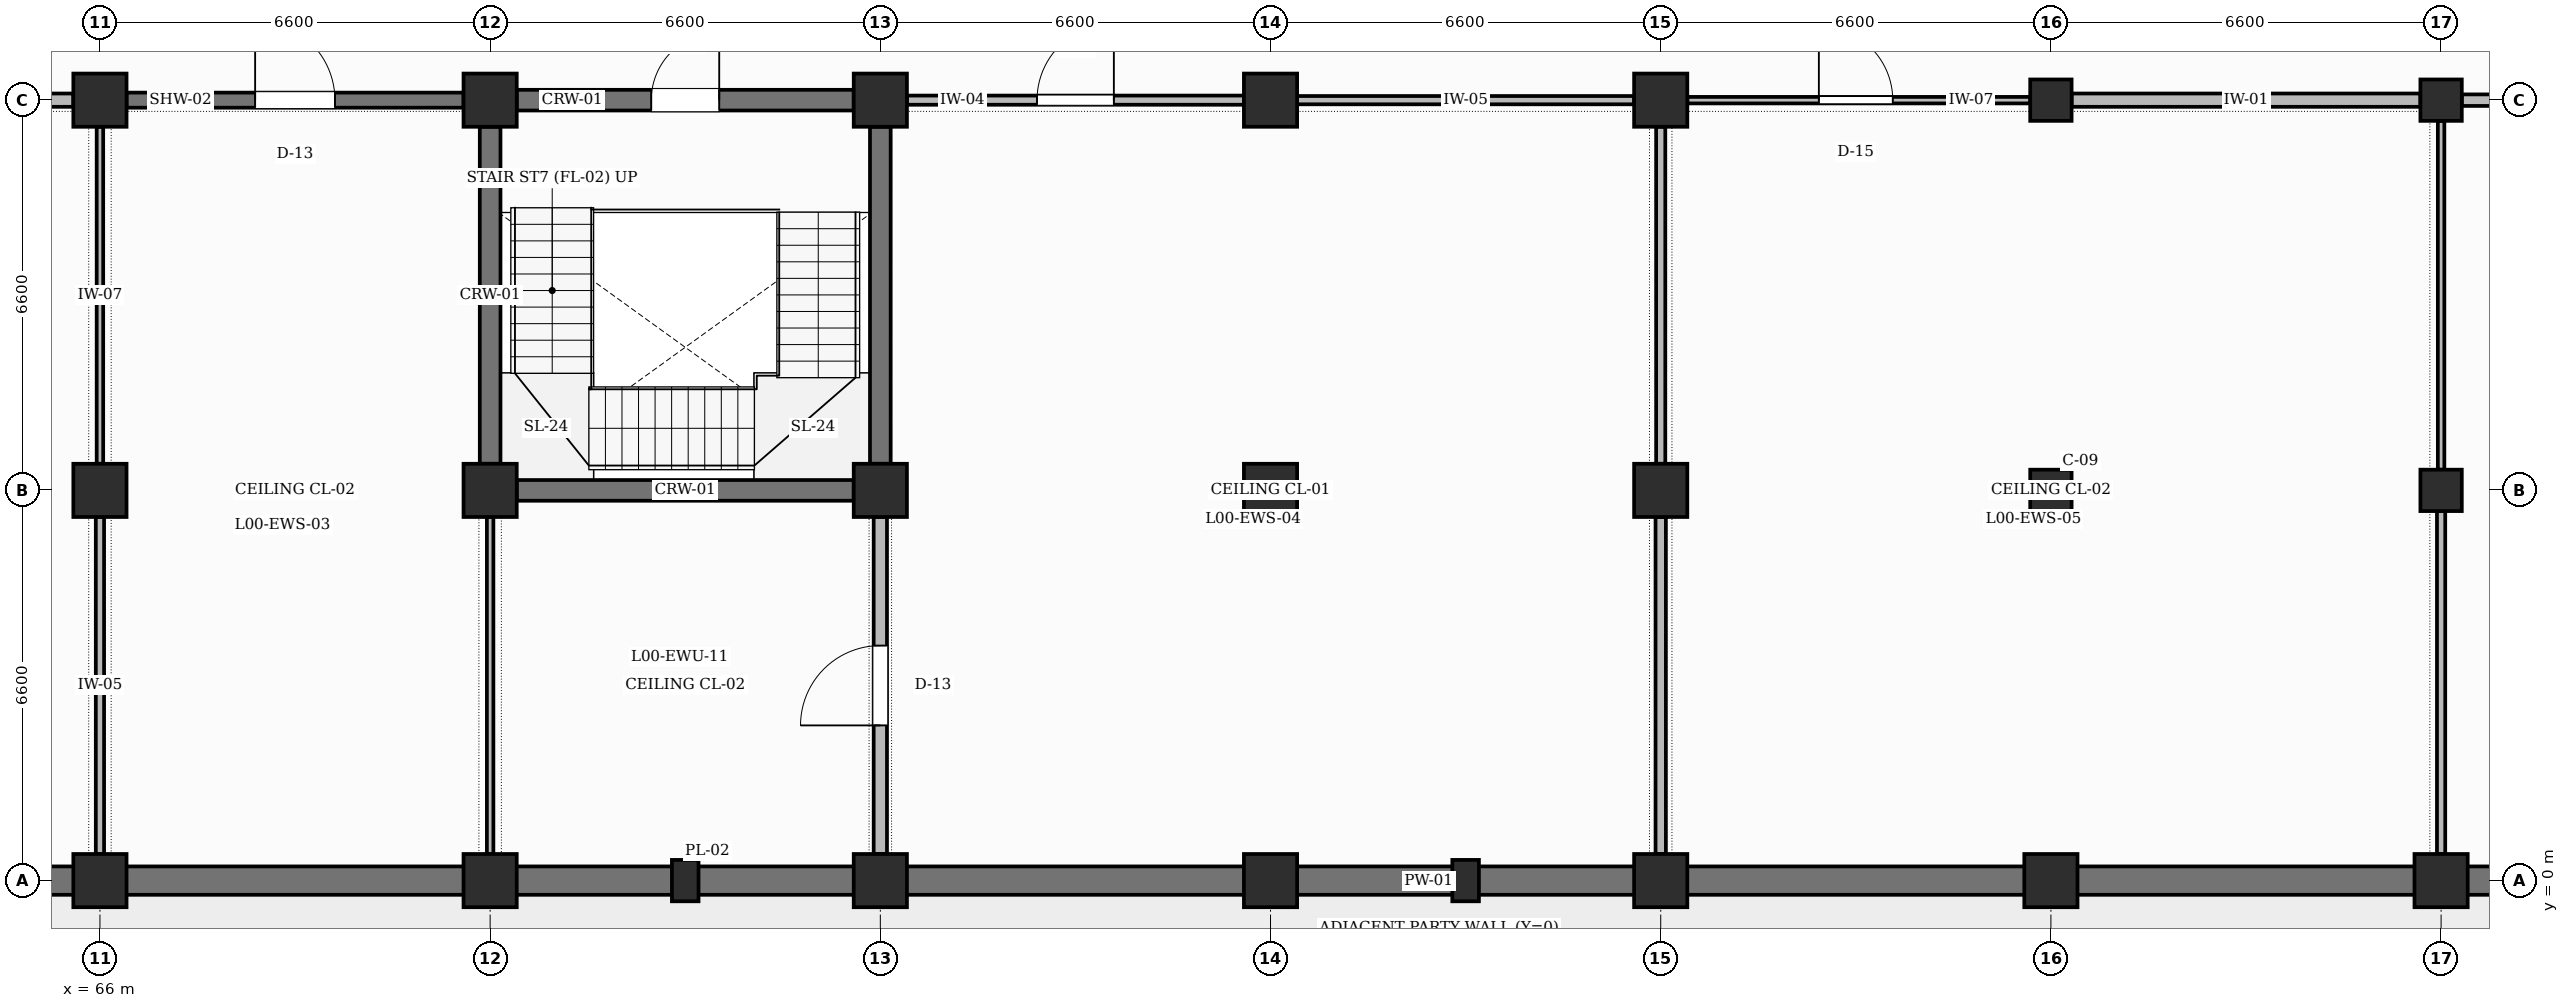
"""IFC4 building model, lengths in metres.
Left out: names, types, materials, properties, quantities, classifications, styles, units other than length and angle.
Written with IfcOpenShell. Run it as: python <this file> out.ifc"""

import sys

from ifc_helpers import new_model, si_unit, direction, frame, frame_2d, origin, origin_2d, place, context, subcontext, project, spatial, rectangle, circle, extrude, element, fill, save


model = new_model("IFC4")
c1 = context("Model", 3, precision=1e-05, world=origin(), true_north=direction((0.0, 1.0)))
c2 = subcontext(c1, "Body", "Model", "MODEL_VIEW")
j1 = project(units=[si_unit("LENGTHUNIT", "METRE"), si_unit("PLANEANGLEUNIT", "RADIAN")], contexts=[c1])
p1 = place(None, origin())
s1 = spatial("IfcSite", under=j1, at=p1, CompositionType="ELEMENT")
p2 = place(p1, origin())
s2 = spatial("IfcBuilding", under=s1, at=p2, CompositionType="ELEMENT")
p3 = place(p2, origin())
s3 = spatial("IfcBuildingStorey", under=s2, at=p3, CompositionType="ELEMENT", Elevation=0.0)
for number, where, z_axis, x_axis in (
    (1, (75.9, 0.0, 0.0), (0.0, 0.0, 1.0), (1.0, 0.0, 0.0)),
    (2, (89.1, 0.0, 0.0), (0.0, 0.0, 1.0), (1.0, 0.0, 0.0)),
):
    element("IfcColumn", number, at=place(p3, frame(where, z_axis=z_axis, x_axis=x_axis)), inside=s3, PredefinedType="PILASTER", context=c2, shape_type="SweptSolid", body=[
        extrude(rectangle(XDim=0.45, YDim=0.7, at=origin_2d()), origin(), (0.0, 0.0, 1.0), 5.4),
    ])
for number, where, z_axis, x_axis in (
    (3, (66.0, 0.0, 0.0), (0.0, 0.0, 1.0), (1.0, 0.0, 0.0)),
    (4, (66.0, 6.6, 0.0), (0.0, 0.0, 1.0), (1.0, 0.0, 0.0)),
    (5, (66.0, 13.2, 0.0), (0.0, 0.0, 1.0), (1.0, 0.0, 0.0)),
    (6, (72.6, 0.0, 0.0), (0.0, 0.0, 1.0), (1.0, 0.0, 0.0)),
    (7, (72.6, 6.6, 0.0), (0.0, 0.0, 1.0), (1.0, 0.0, 0.0)),
    (8, (72.6, 13.2, 0.0), (0.0, 0.0, 1.0), (1.0, 0.0, 0.0)),
    (9, (79.2, 0.0, 0.0), (0.0, 0.0, 1.0), (1.0, 0.0, 0.0)),
    (10, (79.2, 6.6, 0.0), (0.0, 0.0, 1.0), (1.0, 0.0, 0.0)),
    (11, (79.2, 13.2, 0.0), (0.0, 0.0, 1.0), (1.0, 0.0, 0.0)),
    (12, (85.8, 0.0, 0.0), (0.0, 0.0, 1.0), (1.0, 0.0, 0.0)),
    (13, (85.8, 6.6, 0.0), (0.0, 0.0, 1.0), (1.0, 0.0, 0.0)),
    (14, (85.8, 13.2, 0.0), (0.0, 0.0, 1.0), (1.0, 0.0, 0.0)),
    (15, (92.4, 0.0, 0.0), (0.0, 0.0, 1.0), (1.0, 0.0, 0.0)),
    (16, (92.4, 6.6, 0.0), (0.0, 0.0, 1.0), (1.0, 0.0, 0.0)),
    (17, (92.4, 13.2, 0.0), (0.0, 0.0, 1.0), (1.0, 0.0, 0.0)),
    (18, (99.0, 0.0, 0.0), (0.0, 0.0, 1.0), (1.0, 0.0, 0.0)),
):
    element("IfcColumn", number, at=place(p3, frame(where, z_axis=z_axis, x_axis=x_axis)), inside=s3, PredefinedType="COLUMN", context=c2, shape_type="SweptSolid", body=[
        extrude(rectangle(XDim=0.9, YDim=0.9, at=origin_2d()), origin(), (0.0, 0.0, 1.0), 5.4),
    ])
for number, where, z_axis, x_axis in (
    (19, (99.0, 6.6, 0.0), (0.0, 0.0, 1.0), (1.0, 0.0, 0.0)),
    (20, (99.0, 13.2, 0.0), (0.0, 0.0, 1.0), (1.0, 0.0, 0.0)),
):
    element("IfcColumn", number, at=place(p3, frame(where, z_axis=z_axis, x_axis=x_axis)), inside=s3, PredefinedType="COLUMN", context=c2, shape_type="SweptSolid", body=[
        extrude(circle(Radius=0.35, at=origin_2d()), origin(), (0.0, 0.0, 1.0), 5.4),
    ])
p4 = place(p3, frame((105.6, 0.0, 0.0), z_axis=(0.0, 0.0, 1.0), x_axis=(1.0, 0.0, 0.0)))
e21 = element("IfcColumn", 21, at=p4, inside=s3, PredefinedType="COLUMN", context=c2, shape_type="SweptSolid", body=[
    extrude(rectangle(XDim=0.9, YDim=0.9, at=origin_2d()), origin(), (0.0, 0.0, 1.0), 5.4),
])
for number, where, z_axis, x_axis in (
    (22, (105.6, 6.6, 0.0), (0.0, 0.0, 1.0), (1.0, 0.0, 0.0)),
    (23, (105.6, 13.2, 0.0), (0.0, 0.0, 1.0), (1.0, 0.0, 0.0)),
):
    element("IfcColumn", number, at=place(p3, frame(where, z_axis=z_axis, x_axis=x_axis)), inside=s3, PredefinedType="COLUMN", context=c2, shape_type="SweptSolid", body=[
        extrude(circle(Radius=0.35, at=origin_2d()), origin(), (0.0, 0.0, 1.0), 5.4),
    ])
for number, where, z_axis, x_axis in (
    (24, (59.85, 0.0, 0.0), (0.0, 0.0, 1.0), (1.0, 0.0, 0.0)),
    (25, (66.45, 0.0, 0.0), (0.0, 0.0, 1.0), (1.0, 0.0, 0.0)),
    (26, (73.05, 0.0, 0.0), (0.0, 0.0, 1.0), (1.0, 0.0, 0.0)),
):
    element("IfcWall", number, at=place(p3, frame(where, z_axis=z_axis, x_axis=x_axis)), inside=s3, PredefinedType="SOLIDWALL", context=c2, shape_type="SweptSolid", body=[
        extrude(rectangle(XDim=5.7, YDim=0.48, at=frame_2d((2.85, 0.0))), origin(), (0.0, 0.0, 1.0), 4.45),
    ])
p5 = place(p3, frame((79.65, 0.0, 0.0), z_axis=(0.0, 0.0, 1.0), x_axis=(1.0, 0.0, 0.0)))
e27 = element("IfcWall", 27, at=p5, inside=s3, PredefinedType="SOLIDWALL", context=c2, shape_type="SweptSolid", body=[
    extrude(rectangle(XDim=5.7, YDim=0.48, at=frame_2d((2.85, 0.0))), origin(), (0.0, 0.0, 1.0), 4.45),
])
for number, where, z_axis, x_axis in (
    (28, (86.25, 0.0, 0.0), (0.0, 0.0, 1.0), (1.0, 0.0, 0.0)),
    (29, (92.85, 0.0, 0.0), (0.0, 0.0, 1.0), (1.0, 0.0, 0.0)),
    (30, (99.45, 0.0, 0.0), (0.0, 0.0, 1.0), (1.0, 0.0, 0.0)),
    (31, (106.05, 0.0, 0.0), (0.0, 0.0, 1.0), (1.0, 0.0, 0.0)),
):
    element("IfcWall", number, at=place(p3, frame(where, z_axis=z_axis, x_axis=x_axis)), inside=s3, PredefinedType="SOLIDWALL", context=c2, shape_type="SweptSolid", body=[
        extrude(rectangle(XDim=5.7, YDim=0.48, at=frame_2d((2.85, 0.0))), origin(), (0.0, 0.0, 1.0), 4.45),
    ])
p6 = place(p3, frame((73.05, 6.6, 0.0), z_axis=(0.0, 0.0, 1.0), x_axis=(1.0, 0.0, 0.0)))
e32 = element("IfcWall", 32, at=p6, inside=s3, PredefinedType="SHEAR", context=c2, shape_type="SweptSolid", body=[
    extrude(rectangle(XDim=5.7, YDim=0.35, at=frame_2d((2.85, 0.0))), origin(), (0.0, 0.0, 1.0), 4.2),
])
p7 = place(p3, frame((73.05, 13.2, 0.0), z_axis=(0.0, 0.0, 1.0), x_axis=(1.0, 0.0, 0.0)))
e33 = element("IfcWall", 33, at=p7, inside=s3, PredefinedType="SHEAR", context=c2, shape_type="SweptSolid", body=[
    extrude(rectangle(XDim=5.7, YDim=0.35, at=frame_2d((2.85, 0.0))), origin(), (0.0, 0.0, 1.0), 4.3),
])
p8 = place(p7, frame((2.275, 0.0, 0.0)))
e34 = element("IfcOpeningElement", 34, at=p8, cuts=e33, PredefinedType="OPENING", context=c2, shape_type="SweptSolid", body=[
    extrude(rectangle(XDim=1.15, YDim=2.2, at=frame_2d((0.575, 1.1))), frame((0.0, 0.185, 0.0), z_axis=(0.0, -1.0, 0.0), x_axis=(1.0, 0.0, 0.0)), (0.0, 0.0, 1.0), 0.37),
])
for number, where, z_axis, x_axis in (
    (35, (72.6, 7.05, 0.0), (0.0, 0.0, 1.0), (0.0, 1.0, 0.0)),
    (36, (79.2, 7.05, 0.0), (0.0, 0.0, 1.0), (0.0, 1.0, 0.0)),
):
    element("IfcWall", number, at=place(p3, frame(where, z_axis=z_axis, x_axis=x_axis)), inside=s3, PredefinedType="SHEAR", context=c2, shape_type="SweptSolid", body=[
        extrude(rectangle(XDim=5.7, YDim=0.35, at=frame_2d((2.85, 0.0))), origin(), (0.0, 0.0, 1.0), 4.3),
    ])
p9 = place(p3, frame((66.0, 0.45, 0.0), z_axis=(0.0, 0.0, 1.0), x_axis=(0.0, 1.0, 0.0)))
e37 = element("IfcWall", 37, at=p9, inside=s3, PredefinedType="PARTITIONING", context=c2, shape_type="SweptSolid", body=[
    extrude(rectangle(XDim=5.7, YDim=0.14, at=frame_2d((2.85, 0.0))), origin(), (0.0, 0.0, 1.0), 4.3),
])
p10 = place(p3, frame((66.0, 7.05, 0.0), z_axis=(0.0, 0.0, 1.0), x_axis=(0.0, 1.0, 0.0)))
e38 = element("IfcWall", 38, at=p10, inside=s3, PredefinedType="PARTITIONING", context=c2, shape_type="SweptSolid", body=[
    extrude(rectangle(XDim=5.7, YDim=0.11, at=frame_2d((2.85, 0.0))), origin(), (0.0, 0.0, 1.0), 4.3),
])
p11 = place(p3, frame((59.85, 13.2, 0.0), z_axis=(0.0, 0.0, 1.0), x_axis=(1.0, 0.0, 0.0)))
e39 = element("IfcWall", 39, at=p11, inside=s3, PredefinedType="PARTITIONING", context=c2, shape_type="SweptSolid", body=[
    extrude(rectangle(XDim=5.7, YDim=0.225, at=frame_2d((2.85, 0.0))), origin(), (0.0, 0.0, 1.0), 4.3),
])
p12 = place(p3, frame((72.6, 0.45, 0.0), z_axis=(0.0, 0.0, 1.0), x_axis=(0.0, 1.0, 0.0)))
e40 = element("IfcWall", 40, at=p12, inside=s3, PredefinedType="PARTITIONING", context=c2, shape_type="SweptSolid", body=[
    extrude(rectangle(XDim=5.7, YDim=0.11, at=frame_2d((2.85, 0.0))), origin(), (0.0, 0.0, 1.0), 4.3),
])
p13 = place(p3, frame((66.45, 13.2, 0.0), z_axis=(0.0, 0.0, 1.0), x_axis=(1.0, 0.0, 0.0)))
e41 = element("IfcWall", 41, at=p13, inside=s3, PredefinedType="SHEAR", context=c2, shape_type="SweptSolid", body=[
    extrude(rectangle(XDim=5.7, YDim=0.255, at=frame_2d((2.85, 0.0))), origin(), (0.0, 0.0, 1.0), 4.2),
])
p14 = place(p13, frame((2.175, 0.0, 0.0)))
e42 = element("IfcOpeningElement", 42, at=p14, cuts=e41, PredefinedType="OPENING", context=c2, shape_type="SweptSolid", body=[
    extrude(rectangle(XDim=1.35, YDim=2.3, at=frame_2d((0.675, 1.15))), frame((0.0, 0.137, 0.0), z_axis=(0.0, -1.0, 0.0), x_axis=(1.0, 0.0, 0.0)), (0.0, 0.0, 1.0), 0.275),
])
p15 = place(p3, frame((79.2, 0.45, 0.0), z_axis=(0.0, 0.0, 1.0), x_axis=(0.0, 1.0, 0.0)))
e43 = element("IfcWall", 43, at=p15, inside=s3, PredefinedType="PARTITIONING", context=c2, shape_type="SweptSolid", body=[
    extrude(rectangle(XDim=5.7, YDim=0.225, at=frame_2d((2.85, 0.0))), origin(), (0.0, 0.0, 1.0), 4.3),
])
p16 = place(p15, frame((2.175, 0.0, 0.0)))
e44 = element("IfcOpeningElement", 44, at=p16, cuts=e43, PredefinedType="OPENING", context=c2, shape_type="SweptSolid", body=[
    extrude(rectangle(XDim=1.35, YDim=2.3, at=frame_2d((0.675, 1.15))), frame((0.0, 0.123, 0.0), z_axis=(0.0, -1.0, 0.0), x_axis=(1.0, 0.0, 0.0)), (0.0, 0.0, 1.0), 0.245),
])
p17 = place(p3, frame((79.65, 13.2, 0.0), z_axis=(0.0, 0.0, 1.0), x_axis=(1.0, 0.0, 0.0)))
e45 = element("IfcWall", 45, at=p17, inside=s3, PredefinedType="PARTITIONING", context=c2, shape_type="SweptSolid", body=[
    extrude(rectangle(XDim=5.7, YDim=0.155, at=frame_2d((2.85, 0.0))), origin(), (0.0, 0.0, 1.0), 4.2),
])
p18 = place(p17, frame((2.2, 0.0, 0.0)))
e46 = element("IfcOpeningElement", 46, at=p18, cuts=e45, PredefinedType="OPENING", context=c2, shape_type="SweptSolid", body=[
    extrude(rectangle(XDim=1.3, YDim=2.3, at=frame_2d((0.65, 1.15))), frame((0.0, 0.087, 0.0), z_axis=(0.0, -1.0, 0.0), x_axis=(1.0, 0.0, 0.0)), (0.0, 0.0, 1.0), 0.175),
])
p19 = place(p3, frame((92.4, 0.45, 0.0), z_axis=(0.0, 0.0, 1.0), x_axis=(0.0, 1.0, 0.0)))
e47 = element("IfcWall", 47, at=p19, inside=s3, PredefinedType="PARTITIONING", context=c2, shape_type="SweptSolid", body=[
    extrude(rectangle(XDim=5.7, YDim=0.175, at=frame_2d((2.85, 0.0))), origin(), (0.0, 0.0, 1.0), 4.3),
])
p20 = place(p3, frame((92.4, 7.05, 0.0), z_axis=(0.0, 0.0, 1.0), x_axis=(0.0, 1.0, 0.0)))
e48 = element("IfcWall", 48, at=p20, inside=s3, PredefinedType="PARTITIONING", context=c2, shape_type="SweptSolid", body=[
    extrude(rectangle(XDim=5.7, YDim=0.155, at=frame_2d((2.85, 0.0))), origin(), (0.0, 0.0, 1.0), 4.3),
])
p21 = place(p3, frame((86.25, 13.2, 0.0), z_axis=(0.0, 0.0, 1.0), x_axis=(1.0, 0.0, 0.0)))
e49 = element("IfcWall", 49, at=p21, inside=s3, PredefinedType="PARTITIONING", context=c2, shape_type="SweptSolid", body=[
    extrude(rectangle(XDim=5.7, YDim=0.14, at=frame_2d((2.85, 0.0))), origin(), (0.0, 0.0, 1.0), 4.3),
])
p22 = place(p3, frame((92.85, 13.2, 0.0), z_axis=(0.0, 0.0, 1.0), x_axis=(1.0, 0.0, 0.0)))
e50 = element("IfcWall", 50, at=p22, inside=s3, PredefinedType="PARTITIONING", context=c2, shape_type="SweptSolid", body=[
    extrude(rectangle(XDim=5.8, YDim=0.11, at=frame_2d((2.9, 0.0))), origin(), (0.0, 0.0, 1.0), 4.2),
])
p23 = place(p22, frame((2.225, 0.0, 0.0)))
e51 = element("IfcOpeningElement", 51, at=p23, cuts=e50, PredefinedType="OPENING", context=c2, shape_type="SweptSolid", body=[
    extrude(rectangle(XDim=1.25, YDim=2.25, at=frame_2d((0.625, 1.125))), frame((0.0, 0.065, 0.0), z_axis=(0.0, -1.0, 0.0), x_axis=(1.0, 0.0, 0.0)), (0.0, 0.0, 1.0), 0.13),
])
p24 = place(p3, frame((105.6, 0.45, 0.0), z_axis=(0.0, 0.0, 1.0), x_axis=(0.0, 1.0, 0.0)))
e52 = element("IfcWall", 52, at=p24, inside=s3, PredefinedType="PARTITIONING", context=c2, shape_type="SweptSolid", body=[
    extrude(rectangle(XDim=5.8, YDim=0.14, at=frame_2d((2.9, 0.0))), origin(), (0.0, 0.0, 1.0), 4.3),
])
p25 = place(p3, frame((105.6, 6.95, 0.0), z_axis=(0.0, 0.0, 1.0), x_axis=(0.0, 1.0, 0.0)))
e53 = element("IfcWall", 53, at=p25, inside=s3, PredefinedType="PARTITIONING", context=c2, shape_type="SweptSolid", body=[
    extrude(rectangle(XDim=5.9, YDim=0.11, at=frame_2d((2.95, 0.0))), origin(), (0.0, 0.0, 1.0), 4.3),
])
p26 = place(p3, frame((99.35, 13.2, 0.0), z_axis=(0.0, 0.0, 1.0), x_axis=(1.0, 0.0, 0.0)))
e54 = element("IfcWall", 54, at=p26, inside=s3, PredefinedType="PARTITIONING", context=c2, shape_type="SweptSolid", body=[
    extrude(rectangle(XDim=5.9, YDim=0.225, at=frame_2d((2.95, 0.0))), origin(), (0.0, 0.0, 1.0), 4.3),
])
p27 = place(p3, frame((105.95, 13.2, 0.0), z_axis=(0.0, 0.0, 1.0), x_axis=(1.0, 0.0, 0.0)))
e55 = element("IfcWall", 55, at=p27, inside=s3, PredefinedType="PARTITIONING", context=c2, shape_type="SweptSolid", body=[
    extrude(rectangle(XDim=5.9, YDim=0.195, at=frame_2d((2.95, 0.0))), origin(), (0.0, 0.0, 1.0), 4.2),
])
p28 = place(p27, frame((2.45, 0.0, 0.0)))
e56 = element("IfcOpeningElement", 56, at=p28, cuts=e55, PredefinedType="OPENING", context=c2, shape_type="SweptSolid", body=[
    extrude(rectangle(XDim=1.0, YDim=2.1, at=frame_2d((0.5, 1.05))), frame((0.0, 0.107, 0.0), z_axis=(0.0, -1.0, 0.0), x_axis=(1.0, 0.0, 0.0)), (0.0, 0.0, 1.0), 0.215),
])
p29 = place(p8, origin())
e57 = element("IfcDoor", 57, at=p29, inside=s3, OperationType="SINGLE_SWING_RIGHT", PredefinedType="DOOR", context=c2, shape_type="SweptSolid", body=[
    extrude(rectangle(XDim=1.15, YDim=2.2, at=frame_2d((0.575, 1.1))), frame((0.0, 0.025, 0.0), z_axis=(0.0, -1.0, 0.0), x_axis=(1.0, 0.0, 0.0)), (0.0, 0.0, 1.0), 0.05),
])
fill(e34, e57)
p30 = place(p14, origin())
e58 = element("IfcDoor", 58, at=p30, inside=s3, OperationType="SINGLE_SWING_LEFT", PredefinedType="DOOR", context=c2, shape_type="SweptSolid", body=[
    extrude(rectangle(XDim=1.35, YDim=2.3, at=frame_2d((0.675, 1.15))), frame((0.0, 0.025, 0.0), z_axis=(0.0, -1.0, 0.0), x_axis=(1.0, 0.0, 0.0)), (0.0, 0.0, 1.0), 0.05),
])
fill(e42, e58)
p31 = place(p18, origin())
e59 = element("IfcDoor", 59, at=p31, inside=s3, OperationType="SINGLE_SWING_RIGHT", PredefinedType="DOOR", context=c2, shape_type="SweptSolid", body=[
    extrude(rectangle(XDim=1.3, YDim=2.3, at=frame_2d((0.65, 1.15))), frame((0.0, 0.025, 0.0), z_axis=(0.0, -1.0, 0.0), x_axis=(1.0, 0.0, 0.0)), (0.0, 0.0, 1.0), 0.05),
])
fill(e46, e59)
p32 = place(p23, origin())
e60 = element("IfcDoor", 60, at=p32, inside=s3, OperationType="SINGLE_SWING_LEFT", PredefinedType="DOOR", context=c2, shape_type="SweptSolid", body=[
    extrude(rectangle(XDim=1.25, YDim=2.25, at=frame_2d((0.625, 1.125))), frame((0.0, 0.025, 0.0), z_axis=(0.0, -1.0, 0.0), x_axis=(1.0, 0.0, 0.0)), (0.0, 0.0, 1.0), 0.05),
])
fill(e51, e60)
p33 = place(p16, origin())
e61 = element("IfcDoor", 61, at=p33, inside=s3, OperationType="SINGLE_SWING_LEFT", PredefinedType="DOOR", context=c2, shape_type="SweptSolid", body=[
    extrude(rectangle(XDim=1.35, YDim=2.3, at=frame_2d((0.675, 1.15))), frame((0.0, 0.025, 0.0), z_axis=(0.0, -1.0, 0.0), x_axis=(1.0, 0.0, 0.0)), (0.0, 0.0, 1.0), 0.05),
])
fill(e44, e61)
save(model, sys.argv[1])
